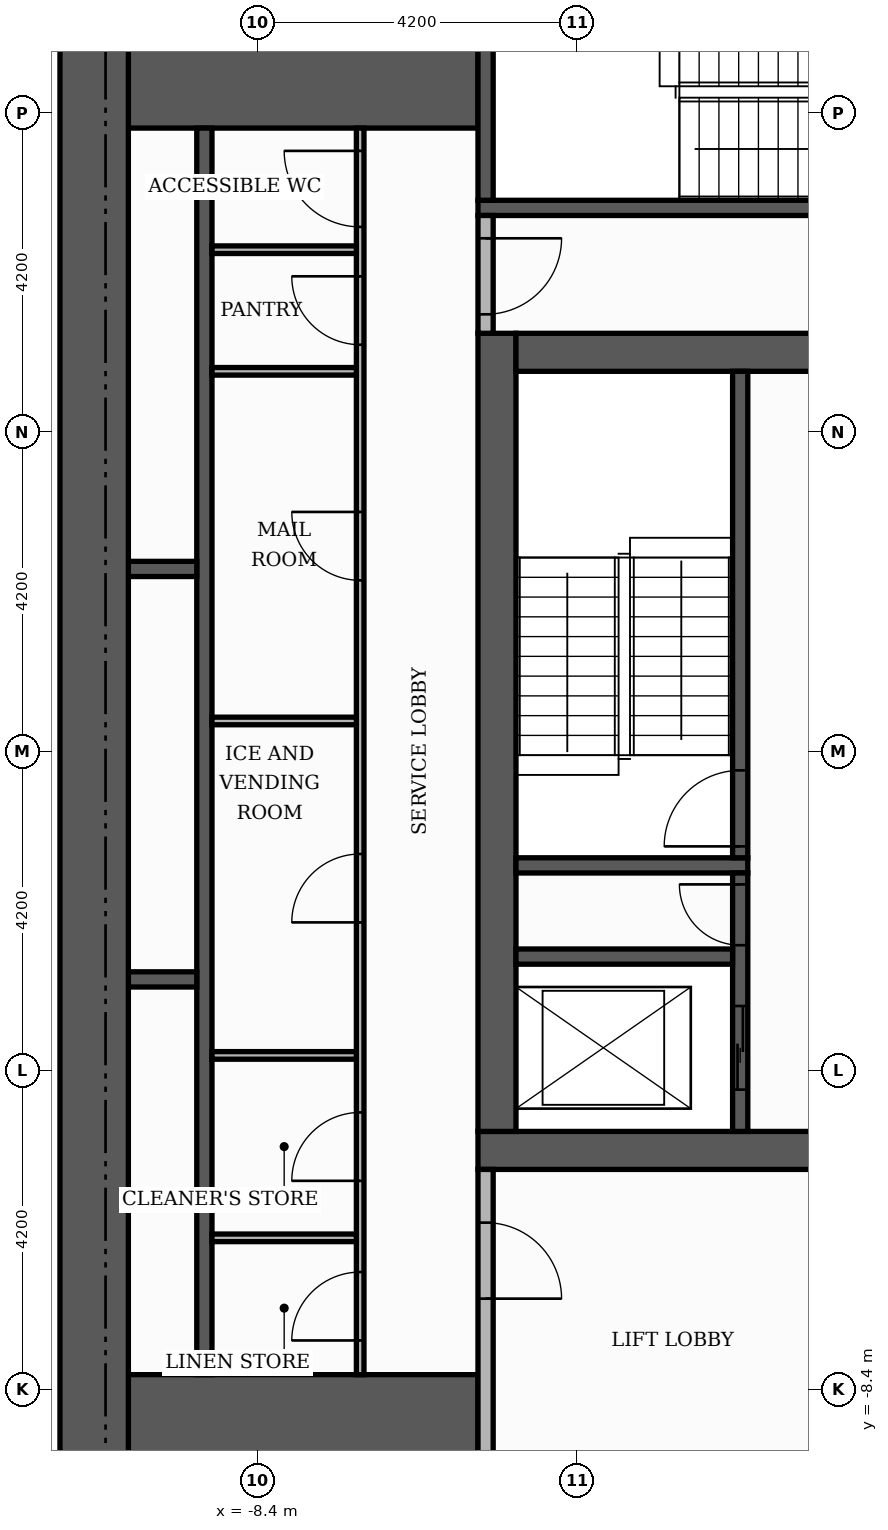
"""IFC4 building model, lengths in metres.
Left out: names, types, materials, properties, quantities, classifications, styles, units other than length and angle.
Written with IfcOpenShell. Run it as: python <this file> out.ifc"""

import sys

from ifc_helpers import new_model, si_unit, direction, frame, frame_2d, origin, place, context, subcontext, project, spatial, rectangle, extrude, element, fill, save


model = new_model("IFC4")
c1 = context("Model", 3, precision=1e-05, world=origin(), true_north=direction((0.0, 1.0)))
c2 = subcontext(c1, "Body", "Model", "MODEL_VIEW")
j1 = project(units=[si_unit("LENGTHUNIT", "METRE"), si_unit("PLANEANGLEUNIT", "RADIAN")], contexts=[c1])
p1 = place(None, origin())
s1 = spatial("IfcSite", under=j1, at=p1, CompositionType="ELEMENT")
p2 = place(p1, origin())
s2 = spatial("IfcBuilding", under=s1, at=p2, CompositionType="ELEMENT")
p3 = place(p2, frame((0.0, 0.0, 192.3)))
s3 = spatial("IfcBuildingStorey", under=s2, at=p3, CompositionType="ELEMENT", Elevation=192.3)
p4 = place(p3, frame((-5.5, -5.25, 0.0), z_axis=(0.0, 0.0, 1.0), x_axis=(1.0, 0.0, 0.0)))
e1 = element("IfcWall", 1, at=p4, inside=s3, PredefinedType="SHEAR", context=c2, shape_type="SweptSolid", body=[
    extrude(rectangle(XDim=11.0, YDim=0.5, at=frame_2d((5.5, 0.0))), origin(), (0.0, 0.0, 1.0), 3.48),
])
p5 = place(p4, frame((4.9, 0.0, 0.0)))
e2 = element("IfcOpeningElement", 2, at=p5, cuts=e1, PredefinedType="OPENING", context=c2, shape_type="SweptSolid", body=[
    extrude(rectangle(XDim=1.2, YDim=2.1, at=frame_2d((0.6, 1.05))), frame((0.0, 0.26, 0.0), z_axis=(0.0, -1.0, 0.0), x_axis=(1.0, 0.0, 0.0)), (0.0, 0.0, 1.0), 0.52),
])
p6 = place(p3, frame((-5.25, -5.0, 0.0), z_axis=(0.0, 0.0, 1.0), x_axis=(0.0, 1.0, 0.0)))
e3 = element("IfcWall", 3, at=p6, inside=s3, PredefinedType="SHEAR", context=c2, shape_type="SweptSolid", body=[
    extrude(rectangle(XDim=10.5, YDim=0.5, at=frame_2d((5.25, 0.0))), origin(), (0.0, 0.0, 1.0), 3.48),
])
p7 = place(p3, frame((-5.0, 5.25, 0.0), z_axis=(0.0, 0.0, 1.0), x_axis=(1.0, 0.0, 0.0)))
e4 = element("IfcWall", 4, at=p7, inside=s3, PredefinedType="SHEAR", context=c2, shape_type="SweptSolid", body=[
    extrude(rectangle(XDim=10.0, YDim=0.5, at=frame_2d((5.0, 0.0))), origin(), (0.0, 0.0, 1.0), 3.48),
])
p8 = place(p7, frame((4.4, 0.0, 0.0)))
e5 = element("IfcOpeningElement", 5, at=p8, cuts=e4, PredefinedType="OPENING", context=c2, shape_type="SweptSolid", body=[
    extrude(rectangle(XDim=1.2, YDim=2.1, at=frame_2d((0.6, 1.05))), frame((0.0, 0.26, 0.0), z_axis=(0.0, -1.0, 0.0), x_axis=(1.0, 0.0, 0.0)), (0.0, 0.0, 1.0), 0.52),
])
for number, where, z_axis, x_axis in (
    (6, (-10.1, -9.15, 0.0), (0.0, 0.0, 1.0), (1.0, 0.0, 0.0)),
    (7, (-10.1, 9.15, 0.0), (0.0, 0.0, 1.0), (1.0, 0.0, 0.0)),
):
    element("IfcWall", number, at=place(p3, frame(where, z_axis=z_axis, x_axis=x_axis)), inside=s3, PredefinedType="SHEAR", context=c2, shape_type="SweptSolid", body=[
        extrude(rectangle(XDim=4.6, YDim=1.9, at=frame_2d((2.3, 0.0))), origin(), (0.0, 0.0, 1.0), 3.48),
    ])
p9 = place(p3, frame((-5.0, -1.5, 0.0), z_axis=(0.0, 0.0, 1.0), x_axis=(1.0, 0.0, 0.0)))
e8 = element("IfcWall", 8, at=p9, inside=s3, PredefinedType="SHEAR", context=c2, shape_type="SweptSolid", body=[
    extrude(rectangle(XDim=3.05, YDim=0.2, at=frame_2d((1.525, 0.0))), origin(), (0.0, 0.0, 1.0), 3.48),
])
p10 = place(p3, frame((-2.05, -1.4, 0.0), z_axis=(0.0, 0.0, 1.0), x_axis=(0.0, 1.0, 0.0)))
e9 = element("IfcWall", 9, at=p10, inside=s3, PredefinedType="SHEAR", context=c2, shape_type="SweptSolid", body=[
    extrude(rectangle(XDim=6.4, YDim=0.2, at=frame_2d((3.2, 0.0))), origin(), (0.0, 0.0, 1.0), 3.48),
])
p11 = place(p10, frame((0.15, 0.0, 0.0)))
e10 = element("IfcOpeningElement", 10, at=p11, cuts=e9, PredefinedType="OPENING", context=c2, shape_type="SweptSolid", body=[
    extrude(rectangle(XDim=1.0, YDim=2.1, at=frame_2d((0.5, 1.05))), frame((0.0, 0.11, 0.0), z_axis=(0.0, -1.0, 0.0), x_axis=(1.0, 0.0, 0.0)), (0.0, 0.0, 1.0), 0.22),
])
p12 = place(p3, frame((-5.5, 7.15, 0.0), z_axis=(0.0, 0.0, 1.0), x_axis=(1.0, 0.0, 0.0)))
e11 = element("IfcWall", 11, at=p12, inside=s3, PredefinedType="SHEAR", context=c2, shape_type="SweptSolid", body=[
    extrude(rectangle(XDim=6.8, YDim=0.2, at=frame_2d((3.4, 0.0))), origin(), (0.0, 0.0, 1.0), 3.48),
])
p13 = place(p3, frame((-5.4, 7.25, 0.0), z_axis=(0.0, 0.0, 1.0), x_axis=(0.0, 1.0, 0.0)))
e12 = element("IfcWall", 12, at=p13, inside=s3, PredefinedType="SHEAR", context=c2, shape_type="SweptSolid", body=[
    extrude(rectangle(XDim=2.85, YDim=0.2, at=frame_2d((1.425, 0.0))), origin(), (0.0, 0.0, 1.0), 3.48),
])
p14 = place(p3, frame((-9.1, -8.2, 0.0), z_axis=(0.0, 0.0, 1.0), x_axis=(0.0, 1.0, 0.0)))
e13 = element("IfcWall", 13, at=p14, inside=s3, PredefinedType="SHEAR", context=c2, shape_type="SweptSolid", body=[
    extrude(rectangle(XDim=16.4, YDim=0.2, at=frame_2d((8.2, 0.0))), origin(), (0.0, 0.0, 1.0), 3.48),
])
p15 = place(p3, frame((-2.05, -5.0, 0.0), z_axis=(0.0, 0.0, 1.0), x_axis=(0.0, 1.0, 0.0)))
e14 = element("IfcWall", 14, at=p15, inside=s3, PredefinedType="SHEAR", context=c2, shape_type="SweptSolid", body=[
    extrude(rectangle(XDim=3.4, YDim=0.2, at=frame_2d((1.7, 0.0))), origin(), (0.0, 0.0, 1.0), 3.48),
])
p16 = place(p15, frame((0.55, 0.0, 0.0)))
e15 = element("IfcOpeningElement", 15, at=p16, cuts=e14, PredefinedType="OPENING", context=c2, shape_type="SweptSolid", body=[
    extrude(rectangle(XDim=1.1, YDim=2.1, at=frame_2d((0.55, 1.05))), frame((0.0, 0.11, 0.0), z_axis=(0.0, -1.0, 0.0), x_axis=(1.0, 0.0, 0.0)), (0.0, 0.0, 1.0), 0.22),
])
p17 = place(p15, frame((2.45, 0.0, 0.0)))
e16 = element("IfcOpeningElement", 16, at=p17, cuts=e14, PredefinedType="OPENING", context=c2, shape_type="SweptSolid", body=[
    extrude(rectangle(XDim=0.8, YDim=2.1, at=frame_2d((0.4, 1.05))), frame((0.0, 0.11, 0.0), z_axis=(0.0, -1.0, 0.0), x_axis=(1.0, 0.0, 0.0)), (0.0, 0.0, 1.0), 0.22),
])
p18 = place(p3, frame((-10.1, -3.0, 0.0), z_axis=(0.0, 0.0, 1.0), x_axis=(1.0, 0.0, 0.0)))
e17 = element("IfcWall", 17, at=p18, inside=s3, PredefinedType="SHEAR", context=c2, shape_type="SweptSolid", body=[
    extrude(rectangle(XDim=0.9, YDim=0.2, at=frame_2d((0.45, 0.0))), origin(), (0.0, 0.0, 1.0), 3.48),
])
p19 = place(p3, frame((-5.0, -2.7, 0.0), z_axis=(0.0, 0.0, 1.0), x_axis=(1.0, 0.0, 0.0)))
e18 = element("IfcWall", 18, at=p19, inside=s3, PredefinedType="SHEAR", context=c2, shape_type="SweptSolid", body=[
    extrude(rectangle(XDim=2.85, YDim=0.2, at=frame_2d((1.425, 0.0))), origin(), (0.0, 0.0, 1.0), 3.48),
])
p20 = place(p3, frame((-10.1, 2.4, 0.0), z_axis=(0.0, 0.0, 1.0), x_axis=(1.0, 0.0, 0.0)))
e19 = element("IfcWall", 19, at=p20, inside=s3, PredefinedType="SHEAR", context=c2, shape_type="SweptSolid", body=[
    extrude(rectangle(XDim=0.9, YDim=0.2, at=frame_2d((0.45, 0.0))), origin(), (0.0, 0.0, 1.0), 3.48),
])
p21 = place(p3, frame((-10.55, -10.1, 0.0), z_axis=(0.0, 0.0, 1.0), x_axis=(0.0, 1.0, 0.0)))
e20 = element("IfcWall", 20, at=p21, inside=s3, PredefinedType="SHEAR", context=c2, shape_type="SweptSolid", body=[
    extrude(rectangle(XDim=20.2, YDim=0.9, at=frame_2d((10.1, 0.0))), origin(), (0.0, 0.0, 1.0), 3.48),
])
p22 = place(p3, frame((-5.4, -10.1, 0.0), z_axis=(0.0, 0.0, 1.0), x_axis=(0.0, 1.0, 0.0)))
e21 = element("IfcWall", 21, at=p22, inside=s3, PredefinedType="PARTITIONING", context=c2, shape_type="SweptSolid", body=[
    extrude(rectangle(XDim=4.6, YDim=0.2, at=frame_2d((2.3, 0.0))), origin(), (0.0, 0.0, 1.0), 3.48),
])
p23 = place(p22, frame((2.9, 0.0, 0.0)))
e22 = element("IfcOpeningElement", 22, at=p23, cuts=e21, PredefinedType="OPENING", context=c2, shape_type="SweptSolid", body=[
    extrude(rectangle(XDim=1.0, YDim=2.1, at=frame_2d((0.5, 1.05))), frame((0.0, 0.11, 0.0), z_axis=(0.0, -1.0, 0.0), x_axis=(1.0, 0.0, 0.0)), (0.0, 0.0, 1.0), 0.22),
])
p24 = place(p3, frame((-7.05, -8.2, 0.0), z_axis=(0.0, 0.0, 1.0), x_axis=(0.0, 1.0, 0.0)))
e23 = element("IfcWall", 23, at=p24, inside=s3, PredefinedType="PARTITIONING", context=c2, shape_type="SweptSolid", body=[
    extrude(rectangle(XDim=16.4, YDim=0.1, at=frame_2d((8.2, 0.0))), origin(), (0.0, 0.0, 1.0), 3.48),
])
p25 = place(p24, frame((0.45, 0.0, 0.0)))
e24 = element("IfcOpeningElement", 24, at=p25, cuts=e23, PredefinedType="OPENING", context=c2, shape_type="SweptSolid", body=[
    extrude(rectangle(XDim=0.9, YDim=2.1, at=frame_2d((0.45, 1.05))), frame((0.0, 0.06, 0.0), z_axis=(0.0, -1.0, 0.0), x_axis=(1.0, 0.0, 0.0)), (0.0, 0.0, 1.0), 0.12),
])
p26 = place(p24, frame((2.55, 0.0, 0.0)))
e25 = element("IfcOpeningElement", 25, at=p26, cuts=e23, PredefinedType="OPENING", context=c2, shape_type="SweptSolid", body=[
    extrude(rectangle(XDim=0.9, YDim=2.1, at=frame_2d((0.45, 1.05))), frame((0.0, 0.06, 0.0), z_axis=(0.0, -1.0, 0.0), x_axis=(1.0, 0.0, 0.0)), (0.0, 0.0, 1.0), 0.12),
])
p27 = place(p24, frame((5.95, 0.0, 0.0)))
e26 = element("IfcOpeningElement", 26, at=p27, cuts=e23, PredefinedType="OPENING", context=c2, shape_type="SweptSolid", body=[
    extrude(rectangle(XDim=0.9, YDim=2.1, at=frame_2d((0.45, 1.05))), frame((0.0, 0.06, 0.0), z_axis=(0.0, -1.0, 0.0), x_axis=(1.0, 0.0, 0.0)), (0.0, 0.0, 1.0), 0.12),
])
p28 = place(p24, frame((10.45, 0.0, 0.0)))
e27 = element("IfcOpeningElement", 27, at=p28, cuts=e23, PredefinedType="OPENING", context=c2, shape_type="SweptSolid", body=[
    extrude(rectangle(XDim=0.9, YDim=2.1, at=frame_2d((0.45, 1.05))), frame((0.0, 0.06, 0.0), z_axis=(0.0, -1.0, 0.0), x_axis=(1.0, 0.0, 0.0)), (0.0, 0.0, 1.0), 0.12),
])
p29 = place(p24, frame((13.55, 0.0, 0.0)))
e28 = element("IfcOpeningElement", 28, at=p29, cuts=e23, PredefinedType="OPENING", context=c2, shape_type="SweptSolid", body=[
    extrude(rectangle(XDim=0.9, YDim=2.1, at=frame_2d((0.45, 1.05))), frame((0.0, 0.06, 0.0), z_axis=(0.0, -1.0, 0.0), x_axis=(1.0, 0.0, 0.0)), (0.0, 0.0, 1.0), 0.12),
])
p30 = place(p24, frame((15.1, 0.0, 0.0)))
e29 = element("IfcOpeningElement", 29, at=p30, cuts=e23, PredefinedType="OPENING", context=c2, shape_type="SweptSolid", body=[
    extrude(rectangle(XDim=1.0, YDim=2.1, at=frame_2d((0.5, 1.05))), frame((0.0, 0.06, 0.0), z_axis=(0.0, -1.0, 0.0), x_axis=(1.0, 0.0, 0.0)), (0.0, 0.0, 1.0), 0.12),
])
for number, where, z_axis, x_axis in (
    (30, (-9.0, -6.4, 0.0), (0.0, 0.0, 1.0), (1.0, 0.0, 0.0)),
    (31, (-9.0, -4.0, 0.0), (0.0, 0.0, 1.0), (1.0, 0.0, 0.0)),
    (32, (-9.0, 0.4, 0.0), (0.0, 0.0, 1.0), (1.0, 0.0, 0.0)),
    (33, (-9.0, 5.0, 0.0), (0.0, 0.0, 1.0), (1.0, 0.0, 0.0)),
):
    element("IfcWall", number, at=place(p3, frame(where, z_axis=z_axis, x_axis=x_axis)), inside=s3, PredefinedType="PARTITIONING", context=c2, shape_type="SweptSolid", body=[
        extrude(rectangle(XDim=1.9, YDim=0.1, at=frame_2d((0.95, 0.0))), origin(), (0.0, 0.0, 1.0), 3.48),
    ])
p31 = place(p3, frame((-5.4, 5.5, 0.0), z_axis=(0.0, 0.0, 1.0), x_axis=(0.0, 1.0, 0.0)))
e34 = element("IfcWall", 34, at=p31, inside=s3, PredefinedType="PARTITIONING", context=c2, shape_type="SweptSolid", body=[
    extrude(rectangle(XDim=1.55, YDim=0.2, at=frame_2d((0.775, 0.0))), origin(), (0.0, 0.0, 1.0), 3.48),
])
p32 = place(p31, frame((0.25, 0.0, 0.0)))
e35 = element("IfcOpeningElement", 35, at=p32, cuts=e34, PredefinedType="OPENING", context=c2, shape_type="SweptSolid", body=[
    extrude(rectangle(XDim=1.0, YDim=2.1, at=frame_2d((0.5, 1.05))), frame((0.0, 0.11, 0.0), z_axis=(0.0, -1.0, 0.0), x_axis=(1.0, 0.0, 0.0)), (0.0, 0.0, 1.0), 0.22),
])
p33 = place(p3, frame((-9.0, 6.6, 0.0), z_axis=(0.0, 0.0, 1.0), x_axis=(1.0, 0.0, 0.0)))
e36 = element("IfcWall", 36, at=p33, inside=s3, PredefinedType="PARTITIONING", context=c2, shape_type="SweptSolid", body=[
    extrude(rectangle(XDim=1.9, YDim=0.1, at=frame_2d((0.95, 0.0))), origin(), (0.0, 0.0, 1.0), 3.48),
])
p34 = place(p16, origin())
e37 = element("IfcDoor", 37, at=p34, inside=s3, OperationType="SLIDING_TO_LEFT", PredefinedType="DOOR", context=c2, shape_type="SweptSolid", body=[
    extrude(rectangle(XDim=1.1, YDim=2.1, at=frame_2d((0.55, 1.05))), frame((0.0, 0.025, 0.0), z_axis=(0.0, -1.0, 0.0), x_axis=(1.0, 0.0, 0.0)), (0.0, 0.0, 1.0), 0.05),
])
fill(e15, e37)
p35 = place(p11, origin())
e38 = element("IfcDoor", 38, at=p35, inside=s3, OperationType="SINGLE_SWING_LEFT", PredefinedType="DOOR", context=c2, shape_type="SweptSolid", body=[
    extrude(rectangle(XDim=1.0, YDim=2.1, at=frame_2d((0.5, 1.05))), frame((0.0, 0.025, 0.0), z_axis=(0.0, -1.0, 0.0), x_axis=(1.0, 0.0, 0.0)), (0.0, 0.0, 1.0), 0.05),
])
fill(e10, e38)
p36 = place(p17, origin())
e39 = element("IfcDoor", 39, at=p36, inside=s3, OperationType="SINGLE_SWING_RIGHT", PredefinedType="DOOR", context=c2, shape_type="SweptSolid", body=[
    extrude(rectangle(XDim=0.8, YDim=2.1, at=frame_2d((0.4, 1.05))), frame((0.0, 0.025, 0.0), z_axis=(0.0, -1.0, 0.0), x_axis=(1.0, 0.0, 0.0)), (0.0, 0.0, 1.0), 0.05),
])
fill(e16, e39)
p37 = place(p32, frame((1.0, 0.0, 0.0), z_axis=(0.0, 0.0, 1.0), x_axis=(-1.0, 0.0, 0.0)))
e40 = element("IfcDoor", 40, at=p37, inside=s3, OperationType="SINGLE_SWING_RIGHT", PredefinedType="DOOR", context=c2, shape_type="SweptSolid", body=[
    extrude(rectangle(XDim=1.0, YDim=2.1, at=frame_2d((0.5, 1.05))), frame((0.0, 0.025, 0.0), z_axis=(0.0, -1.0, 0.0), x_axis=(1.0, 0.0, 0.0)), (0.0, 0.0, 1.0), 0.05),
])
fill(e35, e40)
p38 = place(p23, frame((1.0, 0.0, 0.0), z_axis=(0.0, 0.0, 1.0), x_axis=(-1.0, 0.0, 0.0)))
e41 = element("IfcDoor", 41, at=p38, inside=s3, OperationType="SINGLE_SWING_LEFT", PredefinedType="DOOR", context=c2, shape_type="SweptSolid", body=[
    extrude(rectangle(XDim=1.0, YDim=2.1, at=frame_2d((0.5, 1.05))), frame((0.0, 0.025, 0.0), z_axis=(0.0, -1.0, 0.0), x_axis=(1.0, 0.0, 0.0)), (0.0, 0.0, 1.0), 0.05),
])
fill(e22, e41)
p39 = place(p25, origin())
e42 = element("IfcDoor", 42, at=p39, inside=s3, OperationType="SINGLE_SWING_LEFT", PredefinedType="DOOR", context=c2, shape_type="SweptSolid", body=[
    extrude(rectangle(XDim=0.9, YDim=2.1, at=frame_2d((0.45, 1.05))), frame((0.0, 0.025, 0.0), z_axis=(0.0, -1.0, 0.0), x_axis=(1.0, 0.0, 0.0)), (0.0, 0.0, 1.0), 0.05),
])
fill(e24, e42)
p40 = place(p26, origin())
e43 = element("IfcDoor", 43, at=p40, inside=s3, OperationType="SINGLE_SWING_LEFT", PredefinedType="DOOR", context=c2, shape_type="SweptSolid", body=[
    extrude(rectangle(XDim=0.9, YDim=2.1, at=frame_2d((0.45, 1.05))), frame((0.0, 0.025, 0.0), z_axis=(0.0, -1.0, 0.0), x_axis=(1.0, 0.0, 0.0)), (0.0, 0.0, 1.0), 0.05),
])
fill(e25, e43)
p41 = place(p27, origin())
e44 = element("IfcDoor", 44, at=p41, inside=s3, OperationType="SINGLE_SWING_LEFT", PredefinedType="DOOR", context=c2, shape_type="SweptSolid", body=[
    extrude(rectangle(XDim=0.9, YDim=2.1, at=frame_2d((0.45, 1.05))), frame((0.0, 0.025, 0.0), z_axis=(0.0, -1.0, 0.0), x_axis=(1.0, 0.0, 0.0)), (0.0, 0.0, 1.0), 0.05),
])
fill(e26, e44)
p42 = place(p28, origin())
e45 = element("IfcDoor", 45, at=p42, inside=s3, OperationType="SINGLE_SWING_RIGHT", PredefinedType="DOOR", context=c2, shape_type="SweptSolid", body=[
    extrude(rectangle(XDim=0.9, YDim=2.1, at=frame_2d((0.45, 1.05))), frame((0.0, 0.025, 0.0), z_axis=(0.0, -1.0, 0.0), x_axis=(1.0, 0.0, 0.0)), (0.0, 0.0, 1.0), 0.05),
])
fill(e27, e45)
p43 = place(p29, origin())
e46 = element("IfcDoor", 46, at=p43, inside=s3, OperationType="SINGLE_SWING_RIGHT", PredefinedType="DOOR", context=c2, shape_type="SweptSolid", body=[
    extrude(rectangle(XDim=0.9, YDim=2.1, at=frame_2d((0.45, 1.05))), frame((0.0, 0.025, 0.0), z_axis=(0.0, -1.0, 0.0), x_axis=(1.0, 0.0, 0.0)), (0.0, 0.0, 1.0), 0.05),
])
fill(e28, e46)
p44 = place(p30, origin())
e47 = element("IfcDoor", 47, at=p44, inside=s3, OperationType="SINGLE_SWING_RIGHT", PredefinedType="DOOR", context=c2, shape_type="SweptSolid", body=[
    extrude(rectangle(XDim=1.0, YDim=2.1, at=frame_2d((0.5, 1.05))), frame((0.0, 0.025, 0.0), z_axis=(0.0, -1.0, 0.0), x_axis=(1.0, 0.0, 0.0)), (0.0, 0.0, 1.0), 0.05),
])
fill(e29, e47)
save(model, sys.argv[1])
